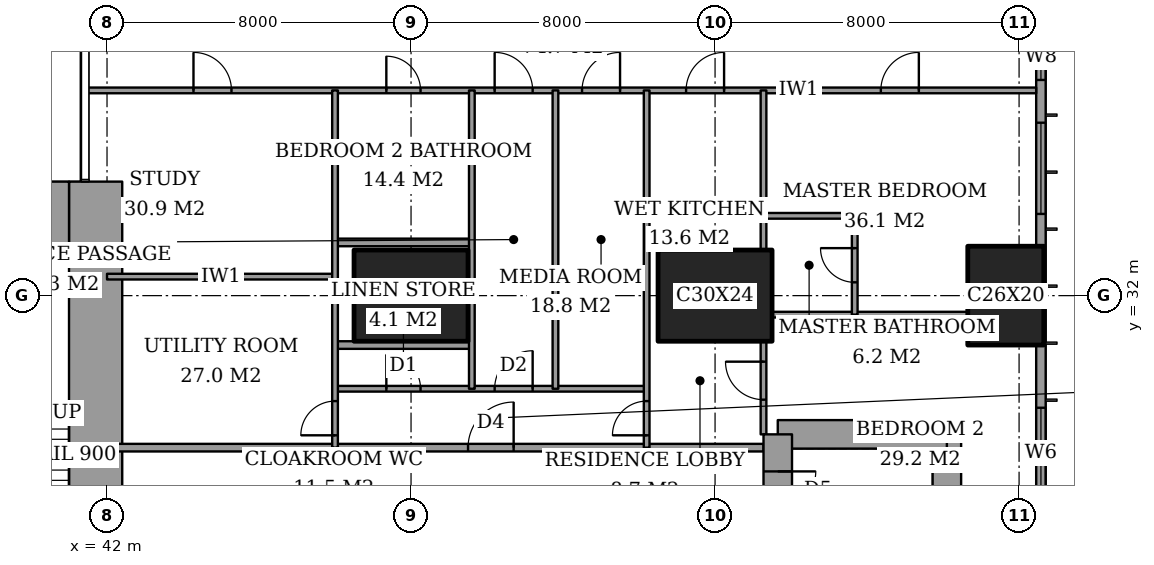
"""IFC4 building model, lengths in metres.
Left out: names, types, materials, properties, quantities, classifications, styles, units other than length and angle.
Written with IfcOpenShell. Run it as: python <this file> out.ifc"""

import sys

from ifc_helpers import new_model, si_unit, direction, frame, frame_2d, origin, origin_2d, place, context, subcontext, project, spatial, rectangle, extrude, element, fill, save


model = new_model("IFC4")
c1 = context("Model", 3, precision=1e-05, world=origin(), true_north=direction((0.0, 1.0)))
c2 = subcontext(c1, "Body", "Model", "MODEL_VIEW")
j1 = project(units=[si_unit("LENGTHUNIT", "METRE"), si_unit("PLANEANGLEUNIT", "RADIAN")], contexts=[c1])
p1 = place(None, origin())
s1 = spatial("IfcSite", under=j1, at=p1, CompositionType="ELEMENT")
p2 = place(p1, origin())
s2 = spatial("IfcBuilding", under=s1, at=p2, CompositionType="ELEMENT")
p3 = place(p2, frame((0.0, 0.0, 69.2)))
s3 = spatial("IfcBuildingStorey", under=s2, at=p3, CompositionType="ELEMENT", Elevation=69.2)
for number, where, z_axis, x_axis in (
    (1, (50.0, 32.0, 0.0), (0.0, 0.0, 1.0), (1.0, 0.0, 0.0)),
    (2, (58.0, 32.0, 0.0), (0.0, 0.0, 1.0), (1.0, 0.0, 0.0)),
):
    element("IfcColumn", number, at=place(p3, frame(where, z_axis=z_axis, x_axis=x_axis)), inside=s3, PredefinedType="COLUMN", context=c2, shape_type="SweptSolid", body=[
        extrude(rectangle(XDim=3.0, YDim=2.4, at=origin_2d()), origin(), (0.0, 0.0, 1.0), 3.6),
    ])
p4 = place(p3, frame((65.65, 32.0, 0.0), z_axis=(0.0, 0.0, 1.0), x_axis=(0.0, 1.0, 0.0)))
e3 = element("IfcColumn", 3, at=p4, inside=s3, PredefinedType="COLUMN", context=c2, shape_type="SweptSolid", body=[
    extrude(rectangle(XDim=2.6, YDim=2.0, at=origin_2d()), origin(), (0.0, 0.0, 1.0), 3.6),
])
p5 = place(p3, frame((37.85, 34.0, 0.0), z_axis=(0.0, 0.0, 1.0), x_axis=(1.0, 0.0, 0.0)))
e4 = element("IfcWall", 4, at=p5, inside=s3, PredefinedType="SHEAR", context=c2, shape_type="SweptSolid", body=[
    extrude(rectangle(XDim=3.15, YDim=2.0, at=frame_2d((1.575, 0.0))), origin(), (0.0, 0.0, 1.0), 3.6),
])
p6 = place(p3, frame((41.7, 24.85, 0.0), z_axis=(0.0, 0.0, 1.0), x_axis=(0.0, 1.0, 0.0)))
e5 = element("IfcWall", 5, at=p6, inside=s3, PredefinedType="SHEAR", context=c2, shape_type="SweptSolid", body=[
    extrude(rectangle(XDim=10.15, YDim=1.4, at=frame_2d((5.075, 0.0))), origin(), (0.0, 0.0, 1.0), 3.6),
])
p7 = place(p3, frame((64.1, 19.65, 0.0), z_axis=(0.0, 0.0, 1.0), x_axis=(0.0, 1.0, 0.0)))
e6 = element("IfcWall", 6, at=p7, inside=s3, PredefinedType="SHEAR", context=c2, shape_type="SweptSolid", body=[
    extrude(rectangle(XDim=8.7, YDim=0.75, at=frame_2d((4.35, 0.0))), origin(), (0.0, 0.0, 1.0), 3.6),
])
p8 = place(p3, frame((64.1, 28.35, 0.0), z_axis=(0.0, 0.0, 1.0), x_axis=(-1.0, 0.0, 0.0)))
e7 = element("IfcWall", 7, at=p8, inside=s3, PredefinedType="SHEAR", context=c2, shape_type="SweptSolid", body=[
    extrude(rectangle(XDim=4.45, YDim=0.75, at=frame_2d((2.225, 0.0))), origin(), (0.0, 0.0, 1.0), 3.6),
])
p9 = place(p3, frame((59.65, 28.35, 0.0), z_axis=(0.0, 0.0, 1.0), x_axis=(0.0, -1.0, 0.0)))
e8 = element("IfcWall", 8, at=p9, inside=s3, PredefinedType="SHEAR", context=c2, shape_type="SweptSolid", body=[
    extrude(rectangle(XDim=8.7, YDim=0.75, at=frame_2d((4.35, 0.0))), origin(), (0.0, 0.0, 1.0), 3.6),
])
p10 = place(p9, frame((0.975, 0.0, 0.0)))
e9 = element("IfcOpeningElement", 9, at=p10, cuts=e8, PredefinedType="OPENING", context=c2, shape_type="SweptSolid", body=[
    extrude(rectangle(XDim=1.0, YDim=2.1, at=frame_2d((0.5, 1.05))), frame((0.0, 0.385, 0.0), z_axis=(0.0, -1.0, 0.0), x_axis=(1.0, 0.0, 0.0)), (0.0, 0.0, 1.0), 0.77),
])
p11 = place(p3, frame((66.575, 3.175, 0.0), z_axis=(0.0, 0.0, 1.0), x_axis=(0.0, 1.0, 0.0)))
e10 = element("IfcWall", 10, at=p11, inside=s3, PredefinedType="SOLIDWALL", context=c2, shape_type="SweptSolid", body=[
    extrude(rectangle(XDim=41.65, YDim=0.25, at=frame_2d((20.825, 0.0))), origin(), (0.0, 0.0, 1.0), 3.6),
])
p12 = place(p11, frame((0.775, 0.0, 0.6)))
e11 = element("IfcOpeningElement", 11, at=p12, cuts=e10, PredefinedType="OPENING", context=c2, shape_type="SweptSolid", body=[
    extrude(rectangle(XDim=2.4, YDim=2.0, at=frame_2d((1.2, 1.0))), frame((0.0, 0.135, 0.0), z_axis=(0.0, -1.0, 0.0), x_axis=(1.0, 0.0, 0.0)), (0.0, 0.0, 1.0), 0.27),
])
p13 = place(p11, frame((6.1, 0.0, 0.6)))
e12 = element("IfcOpeningElement", 12, at=p13, cuts=e10, PredefinedType="OPENING", context=c2, shape_type="SweptSolid", body=[
    extrude(rectangle(XDim=1.2, YDim=2.0, at=frame_2d((0.6, 1.0))), frame((0.0, 0.135, 0.0), z_axis=(0.0, -1.0, 0.0), x_axis=(1.0, 0.0, 0.0)), (0.0, 0.0, 1.0), 0.27),
])
p14 = place(p11, frame((8.275, 0.0, 0.6)))
e13 = element("IfcOpeningElement", 13, at=p14, cuts=e10, PredefinedType="OPENING", context=c2, shape_type="SweptSolid", body=[
    extrude(rectangle(XDim=2.4, YDim=2.0, at=frame_2d((1.2, 1.0))), frame((0.0, 0.135, 0.0), z_axis=(0.0, -1.0, 0.0), x_axis=(1.0, 0.0, 0.0)), (0.0, 0.0, 1.0), 0.27),
])
p15 = place(p11, frame((15.775, 0.0, 0.6)))
e14 = element("IfcOpeningElement", 14, at=p15, cuts=e10, PredefinedType="OPENING", context=c2, shape_type="SweptSolid", body=[
    extrude(rectangle(XDim=2.4, YDim=2.0, at=frame_2d((1.2, 1.0))), frame((0.0, 0.135, 0.0), z_axis=(0.0, -1.0, 0.0), x_axis=(1.0, 0.0, 0.0)), (0.0, 0.0, 1.0), 0.27),
])
p16 = place(p11, frame((23.475, 0.0, 0.6)))
e15 = element("IfcOpeningElement", 15, at=p16, cuts=e10, PredefinedType="OPENING", context=c2, shape_type="SweptSolid", body=[
    extrude(rectangle(XDim=2.4, YDim=2.0, at=frame_2d((1.2, 1.0))), frame((0.0, 0.135, 0.0), z_axis=(0.0, -1.0, 0.0), x_axis=(1.0, 0.0, 0.0)), (0.0, 0.0, 1.0), 0.27),
])
p17 = place(p11, frame((30.975, 0.0, 0.6)))
e16 = element("IfcOpeningElement", 16, at=p17, cuts=e10, PredefinedType="OPENING", context=c2, shape_type="SweptSolid", body=[
    extrude(rectangle(XDim=2.4, YDim=2.0, at=frame_2d((1.2, 1.0))), frame((0.0, 0.135, 0.0), z_axis=(0.0, -1.0, 0.0), x_axis=(1.0, 0.0, 0.0)), (0.0, 0.0, 1.0), 0.27),
])
p18 = place(p11, frame((34.5, 0.0, 0.6)))
e17 = element("IfcOpeningElement", 17, at=p18, cuts=e10, PredefinedType="OPENING", context=c2, shape_type="SweptSolid", body=[
    extrude(rectangle(XDim=1.2, YDim=2.0, at=frame_2d((0.6, 1.0))), frame((0.0, 0.135, 0.0), z_axis=(0.0, -1.0, 0.0), x_axis=(1.0, 0.0, 0.0)), (0.0, 0.0, 1.0), 0.27),
])
p19 = place(p11, frame((38.475, 0.0, 0.6)))
e18 = element("IfcOpeningElement", 18, at=p19, cuts=e10, PredefinedType="OPENING", context=c2, shape_type="SweptSolid", body=[
    extrude(rectangle(XDim=2.4, YDim=2.0, at=frame_2d((1.2, 1.0))), frame((0.0, 0.135, 0.0), z_axis=(0.0, -1.0, 0.0), x_axis=(1.0, 0.0, 0.0)), (0.0, 0.0, 1.0), 0.27),
])
p20 = place(p3, frame((42.0, 28.0, 0.0), z_axis=(0.0, 0.0, 1.0), x_axis=(1.0, 0.0, 0.0)))
e19 = element("IfcWall", 19, at=p20, inside=s3, PredefinedType="PARTITIONING", context=c2, shape_type="SweptSolid", body=[
    extrude(rectangle(XDim=17.275, YDim=0.2, at=frame_2d((8.637, 0.0))), origin(), (0.0, 0.0, 1.0), 3.35),
])
p21 = place(p20, frame((9.5, 0.0, 0.0)))
e20 = element("IfcOpeningElement", 20, at=p21, cuts=e19, PredefinedType="OPENING", context=c2, shape_type="SweptSolid", body=[
    extrude(rectangle(XDim=1.2, YDim=2.4, at=frame_2d((0.6, 1.2))), frame((0.0, 0.11, 0.0), z_axis=(0.0, -1.0, 0.0), x_axis=(1.0, 0.0, 0.0)), (0.0, 0.0, 1.0), 0.22),
])
p22 = place(p3, frame((48.0, 29.55, 0.0), z_axis=(0.0, 0.0, 1.0), x_axis=(1.0, 0.0, 0.0)))
e21 = element("IfcWall", 21, at=p22, inside=s3, PredefinedType="PARTITIONING", context=c2, shape_type="SweptSolid", body=[
    extrude(rectangle(XDim=8.2, YDim=0.15, at=frame_2d((4.1, 0.0))), origin(), (0.0, 0.0, 1.0), 3.35),
])
p23 = place(p22, frame((4.2, 0.0, 0.0)))
e22 = element("IfcOpeningElement", 22, at=p23, cuts=e21, PredefinedType="OPENING", context=c2, shape_type="SweptSolid", body=[
    extrude(rectangle(XDim=1.0, YDim=2.1, at=frame_2d((0.5, 1.05))), frame((0.0, 0.085, 0.0), z_axis=(0.0, -1.0, 0.0), x_axis=(1.0, 0.0, 0.0)), (0.0, 0.0, 1.0), 0.17),
])
p24 = place(p22, frame((1.35, 0.0, 0.0)))
e23 = element("IfcOpeningElement", 23, at=p24, cuts=e21, PredefinedType="OPENING", context=c2, shape_type="SweptSolid", body=[
    extrude(rectangle(XDim=0.9, YDim=2.1, at=frame_2d((0.45, 1.05))), frame((0.0, 0.085, 0.0), z_axis=(0.0, -1.0, 0.0), x_axis=(1.0, 0.0, 0.0)), (0.0, 0.0, 1.0), 0.17),
])
p25 = place(p3, frame((48.0, 30.7, 0.0), z_axis=(0.0, 0.0, 1.0), x_axis=(1.0, 0.0, 0.0)))
e24 = element("IfcWall", 24, at=p25, inside=s3, PredefinedType="PARTITIONING", context=c2, shape_type="SweptSolid", body=[
    extrude(rectangle(XDim=3.6, YDim=0.2, at=frame_2d((1.8, 0.0))), origin(), (0.0, 0.0, 1.0), 3.35),
])
p26 = place(p3, frame((59.5, 31.5, 0.0), z_axis=(0.0, 0.0, 1.0), x_axis=(1.0, 0.0, 0.0)))
e25 = element("IfcWall", 25, at=p26, inside=s3, PredefinedType="PARTITIONING", context=c2, shape_type="SweptSolid", body=[
    extrude(rectangle(XDim=5.15, YDim=0.15, at=frame_2d((2.575, 0.0))), origin(), (0.0, 0.0, 1.0), 3.35),
])
p27 = place(p3, frame((42.0, 32.5, 0.0), z_axis=(0.0, 0.0, 1.0), x_axis=(1.0, 0.0, 0.0)))
e26 = element("IfcWall", 26, at=p27, inside=s3, PredefinedType="PARTITIONING", context=c2, shape_type="SweptSolid", body=[
    extrude(rectangle(XDim=6.0, YDim=0.15, at=frame_2d((3.0, 0.0))), origin(), (0.0, 0.0, 1.0), 3.35),
])
p28 = place(p3, frame((48.0, 33.4, 0.0), z_axis=(0.0, 0.0, 1.0), x_axis=(1.0, 0.0, 0.0)))
e27 = element("IfcWall", 27, at=p28, inside=s3, PredefinedType="PARTITIONING", context=c2, shape_type="SweptSolid", body=[
    extrude(rectangle(XDim=3.6, YDim=0.2, at=frame_2d((1.8, 0.0))), origin(), (0.0, 0.0, 1.0), 3.35),
])
p29 = place(p3, frame((59.275, 34.1, 0.0), z_axis=(0.0, 0.0, 1.0), x_axis=(1.0, 0.0, 0.0)))
e28 = element("IfcWall", 28, at=p29, inside=s3, PredefinedType="PARTITIONING", context=c2, shape_type="SweptSolid", body=[
    extrude(rectangle(XDim=2.4, YDim=0.15, at=frame_2d((1.2, 0.0))), origin(), (0.0, 0.0, 1.0), 3.35),
])
p30 = place(p3, frame((41.439, 37.4, 0.0), z_axis=(0.0, 0.0, 1.0), x_axis=(1.0, 0.0, 0.0)))
e29 = element("IfcWall", 29, at=p30, inside=s3, PredefinedType="PARTITIONING", context=c2, shape_type="SweptSolid", body=[
    extrude(rectangle(XDim=25.011, YDim=0.15, at=frame_2d((12.505, 0.0))), origin(), (0.0, 0.0, 1.0), 3.35),
])
p31 = place(p30, frame((10.761, 0.0, 0.0)))
e30 = element("IfcOpeningElement", 30, at=p31, cuts=e29, PredefinedType="OPENING", context=c2, shape_type="SweptSolid", body=[
    extrude(rectangle(XDim=1.0, YDim=2.1, at=frame_2d((0.5, 1.05))), frame((0.0, 0.085, 0.0), z_axis=(0.0, -1.0, 0.0), x_axis=(1.0, 0.0, 0.0)), (0.0, 0.0, 1.0), 0.17),
])
p32 = place(p30, frame((20.924, 0.0, 0.0)))
e31 = element("IfcOpeningElement", 31, at=p32, cuts=e29, PredefinedType="OPENING", context=c2, shape_type="SweptSolid", body=[
    extrude(rectangle(XDim=1.0, YDim=2.1, at=frame_2d((0.5, 1.05))), frame((0.0, 0.085, 0.0), z_axis=(0.0, -1.0, 0.0), x_axis=(1.0, 0.0, 0.0)), (0.0, 0.0, 1.0), 0.17),
])
p33 = place(p30, frame((15.799, 0.0, 0.0)))
e32 = element("IfcOpeningElement", 32, at=p33, cuts=e29, PredefinedType="OPENING", context=c2, shape_type="SweptSolid", body=[
    extrude(rectangle(XDim=1.0, YDim=2.1, at=frame_2d((0.5, 1.05))), frame((0.0, 0.085, 0.0), z_axis=(0.0, -1.0, 0.0), x_axis=(1.0, 0.0, 0.0)), (0.0, 0.0, 1.0), 0.17),
])
p34 = place(p30, frame((13.061, 0.0, 0.0)))
e33 = element("IfcOpeningElement", 33, at=p34, cuts=e29, PredefinedType="OPENING", context=c2, shape_type="SweptSolid", body=[
    extrude(rectangle(XDim=1.0, YDim=2.1, at=frame_2d((0.5, 1.05))), frame((0.0, 0.085, 0.0), z_axis=(0.0, -1.0, 0.0), x_axis=(1.0, 0.0, 0.0)), (0.0, 0.0, 1.0), 0.17),
])
p35 = place(p30, frame((7.911, 0.0, 0.0)))
e34 = element("IfcOpeningElement", 34, at=p35, cuts=e29, PredefinedType="OPENING", context=c2, shape_type="SweptSolid", body=[
    extrude(rectangle(XDim=0.9, YDim=2.1, at=frame_2d((0.45, 1.05))), frame((0.0, 0.085, 0.0), z_axis=(0.0, -1.0, 0.0), x_axis=(1.0, 0.0, 0.0)), (0.0, 0.0, 1.0), 0.17),
])
p36 = place(p30, frame((2.836, 0.0, 0.0)))
e35 = element("IfcOpeningElement", 35, at=p36, cuts=e29, PredefinedType="OPENING", context=c2, shape_type="SweptSolid", body=[
    extrude(rectangle(XDim=1.0, YDim=2.1, at=frame_2d((0.5, 1.05))), frame((0.0, 0.085, 0.0), z_axis=(0.0, -1.0, 0.0), x_axis=(1.0, 0.0, 0.0)), (0.0, 0.0, 1.0), 0.17),
])
p37 = place(p3, frame((48.0, 28.0, 0.0), z_axis=(0.0, 0.0, 1.0), x_axis=(0.0, 1.0, 0.0)))
e36 = element("IfcWall", 36, at=p37, inside=s3, PredefinedType="PARTITIONING", context=c2, shape_type="SweptSolid", body=[
    extrude(rectangle(XDim=9.4, YDim=0.15, at=frame_2d((4.7, 0.0))), origin(), (0.0, 0.0, 1.0), 3.35),
])
p38 = place(p37, frame((0.325, 0.0, 0.0)))
e37 = element("IfcOpeningElement", 37, at=p38, cuts=e36, PredefinedType="OPENING", context=c2, shape_type="SweptSolid", body=[
    extrude(rectangle(XDim=0.9, YDim=2.1, at=frame_2d((0.45, 1.05))), frame((0.0, 0.085, 0.0), z_axis=(0.0, -1.0, 0.0), x_axis=(1.0, 0.0, 0.0)), (0.0, 0.0, 1.0), 0.17),
])
for number, where, z_axis, x_axis in (
    (38, (51.6, 29.55, 0.0), (0.0, 0.0, 1.0), (0.0, 1.0, 0.0)),
    (39, (53.8, 29.55, 0.0), (0.0, 0.0, 1.0), (0.0, 1.0, 0.0)),
):
    element("IfcWall", number, at=place(p3, frame(where, z_axis=z_axis, x_axis=x_axis)), inside=s3, PredefinedType="PARTITIONING", context=c2, shape_type="SweptSolid", body=[
        extrude(rectangle(XDim=7.85, YDim=0.15, at=frame_2d((3.925, 0.0))), origin(), (0.0, 0.0, 1.0), 3.35),
    ])
p39 = place(p3, frame((56.2, 28.0, 0.0), z_axis=(0.0, 0.0, 1.0), x_axis=(0.0, 1.0, 0.0)))
e40 = element("IfcWall", 40, at=p39, inside=s3, PredefinedType="PARTITIONING", context=c2, shape_type="SweptSolid", body=[
    extrude(rectangle(XDim=9.4, YDim=0.15, at=frame_2d((4.7, 0.0))), origin(), (0.0, 0.0, 1.0), 3.35),
])
p40 = place(p39, frame((0.325, 0.0, 0.0)))
e41 = element("IfcOpeningElement", 41, at=p40, cuts=e40, PredefinedType="OPENING", context=c2, shape_type="SweptSolid", body=[
    extrude(rectangle(XDim=0.9, YDim=2.1, at=frame_2d((0.45, 1.05))), frame((0.0, 0.085, 0.0), z_axis=(0.0, -1.0, 0.0), x_axis=(1.0, 0.0, 0.0)), (0.0, 0.0, 1.0), 0.17),
])
p41 = place(p3, frame((59.275, 28.35, 0.0), z_axis=(0.0, 0.0, 1.0), x_axis=(0.0, 1.0, 0.0)))
e42 = element("IfcWall", 42, at=p41, inside=s3, PredefinedType="PARTITIONING", context=c2, shape_type="SweptSolid", body=[
    extrude(rectangle(XDim=2.45, YDim=0.15, at=frame_2d((1.225, 0.0))), origin(), (0.0, 0.0, 1.0), 3.35),
])
p42 = place(p41, frame((0.913, 0.0, 0.0)))
e43 = element("IfcOpeningElement", 43, at=p42, cuts=e42, PredefinedType="OPENING", context=c2, shape_type="SweptSolid", body=[
    extrude(rectangle(XDim=1.0, YDim=2.1, at=frame_2d((0.5, 1.05))), frame((0.0, 0.085, 0.0), z_axis=(0.0, -1.0, 0.0), x_axis=(1.0, 0.0, 0.0)), (0.0, 0.0, 1.0), 0.17),
])
p43 = place(p3, frame((59.275, 33.2, 0.0), z_axis=(0.0, 0.0, 1.0), x_axis=(0.0, 1.0, 0.0)))
e44 = element("IfcWall", 44, at=p43, inside=s3, PredefinedType="PARTITIONING", context=c2, shape_type="SweptSolid", body=[
    extrude(rectangle(XDim=4.2, YDim=0.15, at=frame_2d((2.1, 0.0))), origin(), (0.0, 0.0, 1.0), 3.35),
])
p44 = place(p3, frame((61.675, 31.5, 0.0), z_axis=(0.0, 0.0, 1.0), x_axis=(0.0, 1.0, 0.0)))
e45 = element("IfcWall", 45, at=p44, inside=s3, PredefinedType="PARTITIONING", context=c2, shape_type="SweptSolid", body=[
    extrude(rectangle(XDim=2.6, YDim=0.15, at=frame_2d((1.3, 0.0))), origin(), (0.0, 0.0, 1.0), 3.35),
])
p45 = place(p44, frame((0.85, 0.0, 0.0)))
e46 = element("IfcOpeningElement", 46, at=p45, cuts=e45, PredefinedType="OPENING", context=c2, shape_type="SweptSolid", body=[
    extrude(rectangle(XDim=0.9, YDim=2.1, at=frame_2d((0.45, 1.05))), frame((0.0, 0.085, 0.0), z_axis=(0.0, -1.0, 0.0), x_axis=(1.0, 0.0, 0.0)), (0.0, 0.0, 1.0), 0.17),
])
p46 = place(p16, origin())
e47 = element("IfcWindow", 47, at=p46, inside=s3, PartitioningType="SINGLE_PANEL", PredefinedType="WINDOW", context=c2, shape_type="SweptSolid", body=[
    extrude(rectangle(XDim=2.4, YDim=2.0, at=frame_2d((1.2, 1.0))), frame((0.0, 0.03, 0.0), z_axis=(0.0, -1.0, 0.0), x_axis=(1.0, 0.0, 0.0)), (0.0, 0.0, 1.0), 0.06),
])
fill(e15, e47)
p47 = place(p17, origin())
e48 = element("IfcWindow", 48, at=p47, inside=s3, PartitioningType="SINGLE_PANEL", PredefinedType="WINDOW", context=c2, shape_type="SweptSolid", body=[
    extrude(rectangle(XDim=2.4, YDim=2.0, at=frame_2d((1.2, 1.0))), frame((0.0, 0.03, 0.0), z_axis=(0.0, -1.0, 0.0), x_axis=(1.0, 0.0, 0.0)), (0.0, 0.0, 1.0), 0.06),
])
fill(e16, e48)
p48 = place(p18, origin())
e49 = element("IfcWindow", 49, at=p48, inside=s3, PartitioningType="SINGLE_PANEL", PredefinedType="WINDOW", context=c2, shape_type="SweptSolid", body=[
    extrude(rectangle(XDim=1.2, YDim=2.0, at=frame_2d((0.6, 1.0))), frame((0.0, 0.03, 0.0), z_axis=(0.0, -1.0, 0.0), x_axis=(1.0, 0.0, 0.0)), (0.0, 0.0, 1.0), 0.06),
])
fill(e17, e49)
p49 = place(p31, origin())
e50 = element("IfcDoor", 50, at=p49, inside=s3, OperationType="SINGLE_SWING_RIGHT", PredefinedType="DOOR", context=c2, shape_type="SweptSolid", body=[
    extrude(rectangle(XDim=1.0, YDim=2.1, at=frame_2d((0.5, 1.05))), frame((0.0, 0.025, 0.0), z_axis=(0.0, -1.0, 0.0), x_axis=(1.0, 0.0, 0.0)), (0.0, 0.0, 1.0), 0.05),
])
fill(e30, e50)
p50 = place(p45, origin())
e51 = element("IfcDoor", 51, at=p50, inside=s3, OperationType="SINGLE_SWING_LEFT", PredefinedType="DOOR", context=c2, shape_type="SweptSolid", body=[
    extrude(rectangle(XDim=0.9, YDim=2.1, at=frame_2d((0.45, 1.05))), frame((0.0, 0.025, 0.0), z_axis=(0.0, -1.0, 0.0), x_axis=(1.0, 0.0, 0.0)), (0.0, 0.0, 1.0), 0.05),
])
fill(e46, e51)
p51 = place(p32, origin())
e52 = element("IfcDoor", 52, at=p51, inside=s3, OperationType="SINGLE_SWING_LEFT", PredefinedType="DOOR", context=c2, shape_type="SweptSolid", body=[
    extrude(rectangle(XDim=1.0, YDim=2.1, at=frame_2d((0.5, 1.05))), frame((0.0, 0.025, 0.0), z_axis=(0.0, -1.0, 0.0), x_axis=(1.0, 0.0, 0.0)), (0.0, 0.0, 1.0), 0.05),
])
fill(e31, e52)
p52 = place(p42, origin())
e53 = element("IfcDoor", 53, at=p52, inside=s3, OperationType="SINGLE_SWING_LEFT", PredefinedType="DOOR", context=c2, shape_type="SweptSolid", body=[
    extrude(rectangle(XDim=1.0, YDim=2.1, at=frame_2d((0.5, 1.05))), frame((0.0, 0.025, 0.0), z_axis=(0.0, -1.0, 0.0), x_axis=(1.0, 0.0, 0.0)), (0.0, 0.0, 1.0), 0.05),
])
fill(e43, e53)
p53 = place(p33, origin())
e54 = element("IfcDoor", 54, at=p53, inside=s3, OperationType="SINGLE_SWING_LEFT", PredefinedType="DOOR", context=c2, shape_type="SweptSolid", body=[
    extrude(rectangle(XDim=1.0, YDim=2.1, at=frame_2d((0.5, 1.05))), frame((0.0, 0.025, 0.0), z_axis=(0.0, -1.0, 0.0), x_axis=(1.0, 0.0, 0.0)), (0.0, 0.0, 1.0), 0.05),
])
fill(e32, e54)
p54 = place(p40, origin())
e55 = element("IfcDoor", 55, at=p54, inside=s3, OperationType="SINGLE_SWING_RIGHT", PredefinedType="DOOR", context=c2, shape_type="SweptSolid", body=[
    extrude(rectangle(XDim=0.9, YDim=2.1, at=frame_2d((0.45, 1.05))), frame((0.0, 0.025, 0.0), z_axis=(0.0, -1.0, 0.0), x_axis=(1.0, 0.0, 0.0)), (0.0, 0.0, 1.0), 0.05),
])
fill(e41, e55)
p55 = place(p21, origin())
e56 = element("IfcDoor", 56, at=p55, inside=s3, OperationType="SINGLE_SWING_LEFT", PredefinedType="DOOR", context=c2, shape_type="SweptSolid", body=[
    extrude(rectangle(XDim=1.2, YDim=2.4, at=frame_2d((0.6, 1.2))), frame((0.0, 0.025, 0.0), z_axis=(0.0, -1.0, 0.0), x_axis=(1.0, 0.0, 0.0)), (0.0, 0.0, 1.0), 0.05),
])
fill(e20, e56)
p56 = place(p34, origin())
e57 = element("IfcDoor", 57, at=p56, inside=s3, OperationType="SINGLE_SWING_LEFT", PredefinedType="DOOR", context=c2, shape_type="SweptSolid", body=[
    extrude(rectangle(XDim=1.0, YDim=2.1, at=frame_2d((0.5, 1.05))), frame((0.0, 0.025, 0.0), z_axis=(0.0, -1.0, 0.0), x_axis=(1.0, 0.0, 0.0)), (0.0, 0.0, 1.0), 0.05),
])
fill(e33, e57)
p57 = place(p23, origin())
e58 = element("IfcDoor", 58, at=p57, inside=s3, OperationType="SINGLE_SWING_LEFT", PredefinedType="DOOR", context=c2, shape_type="SweptSolid", body=[
    extrude(rectangle(XDim=1.0, YDim=2.1, at=frame_2d((0.5, 1.05))), frame((0.0, 0.025, 0.0), z_axis=(0.0, -1.0, 0.0), x_axis=(1.0, 0.0, 0.0)), (0.0, 0.0, 1.0), 0.05),
])
fill(e22, e58)
p58 = place(p24, origin())
e59 = element("IfcDoor", 59, at=p58, inside=s3, OperationType="SINGLE_SWING_RIGHT", PredefinedType="DOOR", context=c2, shape_type="SweptSolid", body=[
    extrude(rectangle(XDim=0.9, YDim=2.1, at=frame_2d((0.45, 1.05))), frame((0.0, 0.025, 0.0), z_axis=(0.0, -1.0, 0.0), x_axis=(1.0, 0.0, 0.0)), (0.0, 0.0, 1.0), 0.05),
])
fill(e23, e59)
p59 = place(p35, origin())
e60 = element("IfcDoor", 60, at=p59, inside=s3, OperationType="SINGLE_SWING_RIGHT", PredefinedType="DOOR", context=c2, shape_type="SweptSolid", body=[
    extrude(rectangle(XDim=0.9, YDim=2.1, at=frame_2d((0.45, 1.05))), frame((0.0, 0.025, 0.0), z_axis=(0.0, -1.0, 0.0), x_axis=(1.0, 0.0, 0.0)), (0.0, 0.0, 1.0), 0.05),
])
fill(e34, e60)
p60 = place(p36, origin())
e61 = element("IfcDoor", 61, at=p60, inside=s3, OperationType="SINGLE_SWING_RIGHT", PredefinedType="DOOR", context=c2, shape_type="SweptSolid", body=[
    extrude(rectangle(XDim=1.0, YDim=2.1, at=frame_2d((0.5, 1.05))), frame((0.0, 0.025, 0.0), z_axis=(0.0, -1.0, 0.0), x_axis=(1.0, 0.0, 0.0)), (0.0, 0.0, 1.0), 0.05),
])
fill(e35, e61)
p61 = place(p38, origin())
e62 = element("IfcDoor", 62, at=p61, inside=s3, OperationType="SINGLE_SWING_RIGHT", PredefinedType="DOOR", context=c2, shape_type="SweptSolid", body=[
    extrude(rectangle(XDim=0.9, YDim=2.1, at=frame_2d((0.45, 1.05))), frame((0.0, 0.025, 0.0), z_axis=(0.0, -1.0, 0.0), x_axis=(1.0, 0.0, 0.0)), (0.0, 0.0, 1.0), 0.05),
])
fill(e37, e62)
p62 = place(p10, origin())
e63 = element("IfcDoor", 63, at=p62, inside=s3, OperationType="SINGLE_SWING_RIGHT", PredefinedType="DOOR", context=c2, shape_type="SweptSolid", body=[
    extrude(rectangle(XDim=1.0, YDim=2.1, at=frame_2d((0.5, 1.05))), frame((0.0, 0.025, 0.0), z_axis=(0.0, -1.0, 0.0), x_axis=(1.0, 0.0, 0.0)), (0.0, 0.0, 1.0), 0.05),
])
fill(e9, e63)
save(model, sys.argv[1])
